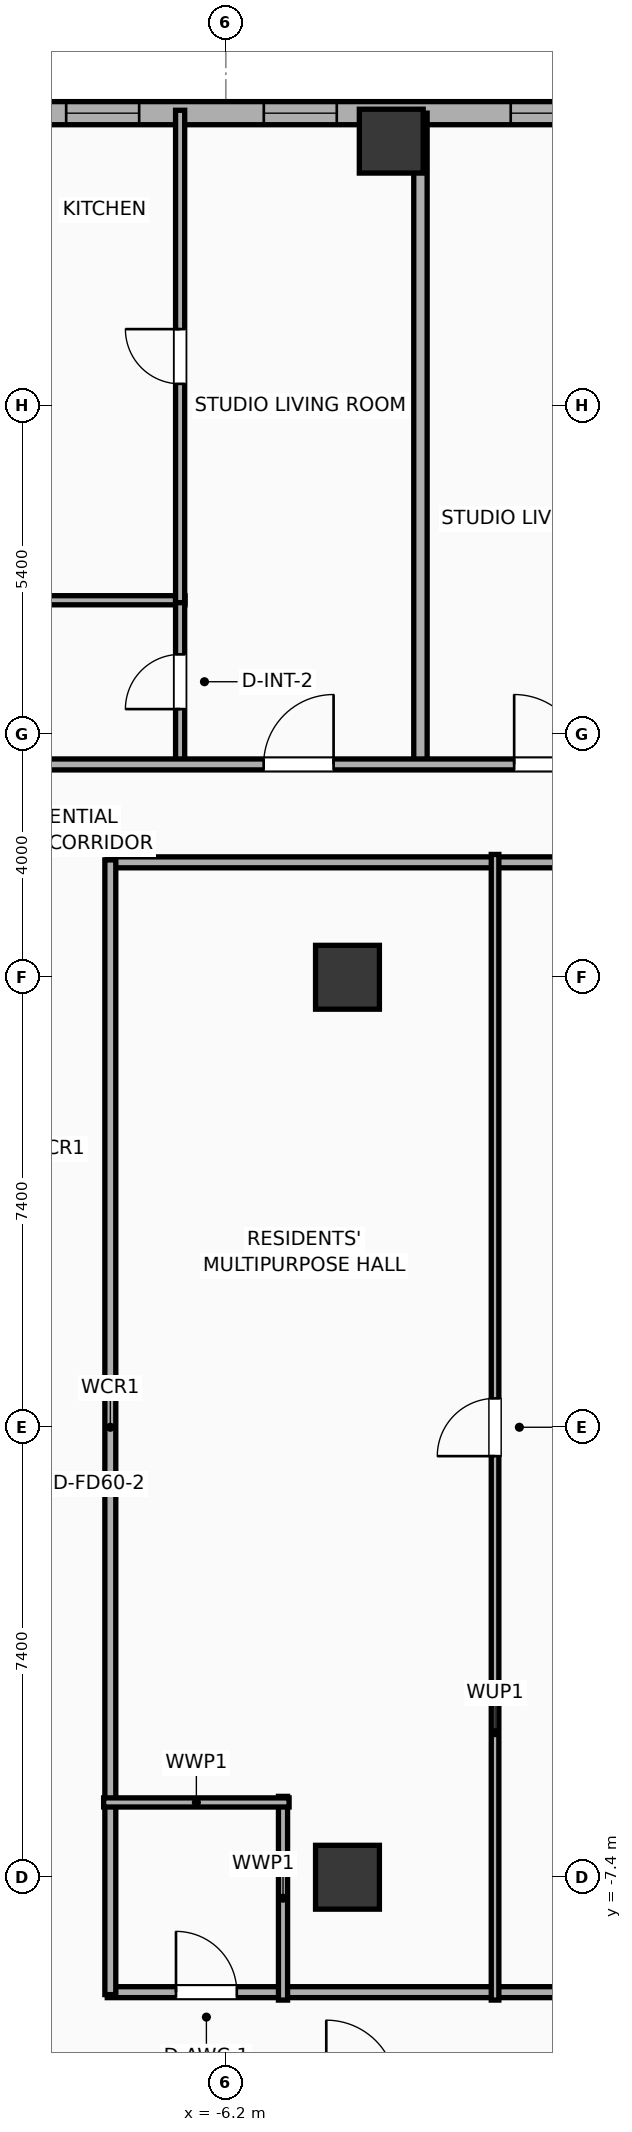
"""IFC4 building model, lengths in metres.
Left out: names, types, materials, properties, quantities, classifications, styles, units other than length and angle.
Written with IfcOpenShell. Run it as: python <this file> out.ifc"""

import sys

from ifc_helpers import new_model, si_unit, direction, frame, frame_2d, origin, origin_2d, place, context, subcontext, project, spatial, rectangle, hollow_rectangle, extrude, element, fill, save


model = new_model("IFC4")
c1 = context("Model", 3, precision=1e-05, world=origin(), true_north=direction((0.0, 1.0)))
c2 = subcontext(c1, "Body", "Model", "MODEL_VIEW")
j1 = project(units=[si_unit("LENGTHUNIT", "METRE"), si_unit("PLANEANGLEUNIT", "RADIAN")], contexts=[c1])
p1 = place(None, origin())
s1 = spatial("IfcSite", under=j1, at=p1, CompositionType="ELEMENT")
p2 = place(p1, origin())
s2 = spatial("IfcBuilding", under=s1, at=p2, CompositionType="ELEMENT")
p3 = place(p2, frame((0.0, 0.0, 89.7)))
s3 = spatial("IfcBuildingStorey", under=s2, at=p3, CompositionType="ELEMENT", Elevation=89.7)
for number, where, z_axis, x_axis in (
    (1, (-4.2, -7.4, 0.0), (0.0, 0.0, 1.0), (1.0, 0.0, 0.0)),
    (2, (-4.2, 7.4, 0.0), (0.0, 0.0, 1.0), (1.0, 0.0, 0.0)),
):
    element("IfcColumn", number, at=place(p3, frame(where, z_axis=z_axis, x_axis=x_axis)), inside=s3, PredefinedType="COLUMN", context=c2, shape_type="SweptSolid", body=[
        extrude(rectangle(XDim=1.05, YDim=1.05, at=origin_2d()), origin(), (0.0, 0.0, 1.0), 3.9),
    ])
p4 = place(p3, frame((-3.48, 21.15, 0.0), z_axis=(0.0, 0.0, 1.0), x_axis=(1.0, 0.0, 0.0)))
e3 = element("IfcColumn", 3, at=p4, inside=s3, PredefinedType="COLUMN", context=c2, shape_type="SweptSolid", body=[
    extrude(hollow_rectangle(XDim=1.05, YDim=1.05, WallThickness=0.036, at=origin_2d()), origin(), (0.0, 0.0, 1.0), 3.9),
])
p5 = place(p3, frame((-25.381, 21.61, 0.0), z_axis=(0.0, 0.0, 1.0), x_axis=(1.0, 0.0, 0.0)))
e4 = element("IfcWall", 4, at=p5, inside=s3, PredefinedType="ELEMENTEDWALL", context=c2, shape_type="SweptSolid", body=[
    extrude(rectangle(XDim=54.763, YDim=0.38, at=frame_2d((27.381, 0.0))), origin(), (0.0, 0.0, 1.0), 2.54),
])
p6 = place(p5, frame((6.495, 0.0, 0.75)))
e5 = element("IfcOpeningElement", 5, at=p6, cuts=e4, PredefinedType="OPENING", context=c2, shape_type="SweptSolid", body=[
    extrude(rectangle(XDim=2.4, YDim=1.63, at=frame_2d((1.2, 0.815))), frame((0.0, 0.2, 0.0), z_axis=(0.0, -1.0, 0.0), x_axis=(1.0, 0.0, 0.0)), (0.0, 0.0, 1.0), 0.4),
])
p7 = place(p5, frame((48.367, 0.0, 0.75)))
e6 = element("IfcOpeningElement", 6, at=p7, cuts=e4, PredefinedType="OPENING", context=c2, shape_type="SweptSolid", body=[
    extrude(rectangle(XDim=2.4, YDim=1.63, at=frame_2d((1.2, 0.815))), frame((0.0, 0.2, 0.0), z_axis=(0.0, -1.0, 0.0), x_axis=(1.0, 0.0, 0.0)), (0.0, 0.0, 1.0), 0.4),
])
p8 = place(p5, frame((1.231, 0.0, 0.75)))
e7 = element("IfcOpeningElement", 7, at=p8, cuts=e4, PredefinedType="OPENING", context=c2, shape_type="SweptSolid", body=[
    extrude(rectangle(XDim=1.2, YDim=1.63, at=frame_2d((0.6, 0.815))), frame((0.0, 0.2, 0.0), z_axis=(0.0, -1.0, 0.0), x_axis=(1.0, 0.0, 0.0)), (0.0, 0.0, 1.0), 0.4),
])
p9 = place(p5, frame((3.772, 0.0, 0.75)))
e8 = element("IfcOpeningElement", 8, at=p9, cuts=e4, PredefinedType="OPENING", context=c2, shape_type="SweptSolid", body=[
    extrude(rectangle(XDim=1.2, YDim=1.63, at=frame_2d((0.6, 0.815))), frame((0.0, 0.2, 0.0), z_axis=(0.0, -1.0, 0.0), x_axis=(1.0, 0.0, 0.0)), (0.0, 0.0, 1.0), 0.4),
])
p10 = place(p5, frame((12.031, 0.0, 0.75)))
e9 = element("IfcOpeningElement", 9, at=p10, cuts=e4, PredefinedType="OPENING", context=c2, shape_type="SweptSolid", body=[
    extrude(rectangle(XDim=1.2, YDim=1.63, at=frame_2d((0.6, 0.815))), frame((0.0, 0.2, 0.0), z_axis=(0.0, -1.0, 0.0), x_axis=(1.0, 0.0, 0.0)), (0.0, 0.0, 1.0), 0.4),
])
p11 = place(p5, frame((19.805, 0.0, 0.75)))
e10 = element("IfcOpeningElement", 10, at=p11, cuts=e4, PredefinedType="OPENING", context=c2, shape_type="SweptSolid", body=[
    extrude(rectangle(XDim=1.2, YDim=1.63, at=frame_2d((0.6, 0.815))), frame((0.0, 0.2, 0.0), z_axis=(0.0, -1.0, 0.0), x_axis=(1.0, 0.0, 0.0)), (0.0, 0.0, 1.0), 0.4),
])
p12 = place(p5, frame((16.555, 0.0, 0.75)))
e11 = element("IfcOpeningElement", 11, at=p12, cuts=e4, PredefinedType="OPENING", context=c2, shape_type="SweptSolid", body=[
    extrude(rectangle(XDim=1.2, YDim=1.63, at=frame_2d((0.6, 0.815))), frame((0.0, 0.2, 0.0), z_axis=(0.0, -1.0, 0.0), x_axis=(1.0, 0.0, 0.0)), (0.0, 0.0, 1.0), 0.4),
])
p13 = place(p5, frame((23.866, 0.0, 0.75)))
e12 = element("IfcOpeningElement", 12, at=p13, cuts=e4, PredefinedType="OPENING", context=c2, shape_type="SweptSolid", body=[
    extrude(rectangle(XDim=1.2, YDim=1.63, at=frame_2d((0.6, 0.815))), frame((0.0, 0.2, 0.0), z_axis=(0.0, -1.0, 0.0), x_axis=(1.0, 0.0, 0.0)), (0.0, 0.0, 1.0), 0.4),
])
p14 = place(p5, frame((27.116, 0.0, 0.75)))
e13 = element("IfcOpeningElement", 13, at=p14, cuts=e4, PredefinedType="OPENING", context=c2, shape_type="SweptSolid", body=[
    extrude(rectangle(XDim=1.2, YDim=1.63, at=frame_2d((0.6, 0.815))), frame((0.0, 0.2, 0.0), z_axis=(0.0, -1.0, 0.0), x_axis=(1.0, 0.0, 0.0)), (0.0, 0.0, 1.0), 0.4),
])
p15 = place(p5, frame((30.931, 0.0, 0.75)))
e14 = element("IfcOpeningElement", 14, at=p15, cuts=e4, PredefinedType="OPENING", context=c2, shape_type="SweptSolid", body=[
    extrude(rectangle(XDim=1.2, YDim=1.63, at=frame_2d((0.6, 0.815))), frame((0.0, 0.2, 0.0), z_axis=(0.0, -1.0, 0.0), x_axis=(1.0, 0.0, 0.0)), (0.0, 0.0, 1.0), 0.4),
])
p16 = place(p5, frame((36.733, 0.0, 0.75)))
e15 = element("IfcOpeningElement", 15, at=p16, cuts=e4, PredefinedType="OPENING", context=c2, shape_type="SweptSolid", body=[
    extrude(rectangle(XDim=1.2, YDim=1.63, at=frame_2d((0.6, 0.815))), frame((0.0, 0.2, 0.0), z_axis=(0.0, -1.0, 0.0), x_axis=(1.0, 0.0, 0.0)), (0.0, 0.0, 1.0), 0.4),
])
p17 = place(p5, frame((39.858, 0.0, 0.75)))
e16 = element("IfcOpeningElement", 16, at=p17, cuts=e4, PredefinedType="OPENING", context=c2, shape_type="SweptSolid", body=[
    extrude(rectangle(XDim=1.2, YDim=1.63, at=frame_2d((0.6, 0.815))), frame((0.0, 0.2, 0.0), z_axis=(0.0, -1.0, 0.0), x_axis=(1.0, 0.0, 0.0)), (0.0, 0.0, 1.0), 0.4),
])
p18 = place(p5, frame((44.636, 0.0, 0.75)))
e17 = element("IfcOpeningElement", 17, at=p18, cuts=e4, PredefinedType="OPENING", context=c2, shape_type="SweptSolid", body=[
    extrude(rectangle(XDim=1.2, YDim=1.63, at=frame_2d((0.6, 0.815))), frame((0.0, 0.2, 0.0), z_axis=(0.0, -1.0, 0.0), x_axis=(1.0, 0.0, 0.0)), (0.0, 0.0, 1.0), 0.4),
])
p19 = place(p5, frame((51.809, 0.0, 0.75)))
e18 = element("IfcOpeningElement", 18, at=p19, cuts=e4, PredefinedType="OPENING", context=c2, shape_type="SweptSolid", body=[
    extrude(rectangle(XDim=1.2, YDim=1.63, at=frame_2d((0.6, 0.815))), frame((0.0, 0.2, 0.0), z_axis=(0.0, -1.0, 0.0), x_axis=(1.0, 0.0, 0.0)), (0.0, 0.0, 1.0), 0.4),
])
p20 = place(p3, frame((-8.15, 9.29, 0.0), z_axis=(0.0, 0.0, 1.0), x_axis=(1.0, 0.0, 0.0)))
e19 = element("IfcWall", 19, at=p20, inside=s3, PredefinedType="PARTITIONING", context=c2, shape_type="SweptSolid", body=[
    extrude(rectangle(XDim=16.3, YDim=0.18, at=frame_2d((8.15, 0.0))), origin(), (0.0, 0.0, 1.0), 3.65),
])
p21 = place(p20, frame((8.49, 0.0, 0.0)))
e20 = element("IfcOpeningElement", 20, at=p21, cuts=e19, PredefinedType="OPENING", context=c2, shape_type="SweptSolid", body=[
    extrude(rectangle(XDim=0.95, YDim=2.05, at=frame_2d((0.475, 1.025))), frame((0.0, 0.1, 0.0), z_axis=(0.0, -1.0, 0.0), x_axis=(1.0, 0.0, 0.0)), (0.0, 0.0, 1.0), 0.2),
])
p22 = place(p3, frame((-8.15, -9.29, 0.0), z_axis=(0.0, 0.0, 1.0), x_axis=(1.0, 0.0, 0.0)))
e21 = element("IfcWall", 21, at=p22, inside=s3, PredefinedType="PARTITIONING", context=c2, shape_type="SweptSolid", body=[
    extrude(rectangle(XDim=16.3, YDim=0.18, at=frame_2d((8.15, 0.0))), origin(), (0.0, 0.0, 1.0), 3.65),
])
p23 = place(p22, frame((1.13, 0.0, 0.0)))
e22 = element("IfcOpeningElement", 22, at=p23, cuts=e21, PredefinedType="OPENING", context=c2, shape_type="SweptSolid", body=[
    extrude(rectangle(XDim=1.0, YDim=2.05, at=frame_2d((0.5, 1.025))), frame((0.0, 0.1, 0.0), z_axis=(0.0, -1.0, 0.0), x_axis=(1.0, 0.0, 0.0)), (0.0, 0.0, 1.0), 0.2),
])
p24 = place(p22, frame((10.12, 0.0, 0.0)))
e23 = element("IfcOpeningElement", 23, at=p24, cuts=e21, PredefinedType="OPENING", context=c2, shape_type="SweptSolid", body=[
    extrude(rectangle(XDim=0.95, YDim=2.05, at=frame_2d((0.475, 1.025))), frame((0.0, 0.1, 0.0), z_axis=(0.0, -1.0, 0.0), x_axis=(1.0, 0.0, 0.0)), (0.0, 0.0, 1.0), 0.2),
])
p25 = place(p3, frame((-8.1, -9.33, 0.0), z_axis=(0.0, 0.0, 1.0), x_axis=(0.0, 1.0, 0.0)))
e24 = element("IfcWall", 24, at=p25, inside=s3, PredefinedType="PARTITIONING", context=c2, shape_type="SweptSolid", body=[
    extrude(rectangle(XDim=18.66, YDim=0.18, at=frame_2d((9.33, 0.0))), origin(), (0.0, 0.0, 1.0), 3.65),
])
p26 = place(p3, frame((-5.26, -9.42, 0.0), z_axis=(0.0, 0.0, 1.0), x_axis=(0.0, 1.0, 0.0)))
e25 = element("IfcWall", 25, at=p26, inside=s3, PredefinedType="PLUMBINGWALL", context=c2, shape_type="SweptSolid", body=[
    extrude(rectangle(XDim=3.35, YDim=0.15, at=frame_2d((1.675, 0.0))), origin(), (0.0, 0.0, 1.0), 3.65),
])
p27 = place(p3, frame((-8.21, -6.17, 0.0), z_axis=(0.0, 0.0, 1.0), x_axis=(1.0, 0.0, 0.0)))
e26 = element("IfcWall", 26, at=p27, inside=s3, PredefinedType="PLUMBINGWALL", context=c2, shape_type="SweptSolid", body=[
    extrude(rectangle(XDim=3.05, YDim=0.15, at=frame_2d((1.525, 0.0))), origin(), (0.0, 0.0, 1.0), 3.65),
])
p28 = place(p3, frame((-1.773, -9.42, 0.0), z_axis=(0.0, 0.0, 1.0), x_axis=(0.0, 1.0, 0.0)))
e27 = element("IfcWall", 27, at=p28, inside=s3, PredefinedType="PARTITIONING", context=c2, shape_type="SweptSolid", body=[
    extrude(rectangle(XDim=18.84, YDim=0.125, at=frame_2d((9.42, 0.0))), origin(), (0.0, 0.0, 1.0), 3.65),
])
p29 = place(p28, frame((8.945, 0.0, 0.0)))
e28 = element("IfcOpeningElement", 28, at=p29, cuts=e27, PredefinedType="OPENING", context=c2, shape_type="SweptSolid", body=[
    extrude(rectangle(XDim=0.95, YDim=2.05, at=frame_2d((0.475, 1.025))), frame((0.0, 0.073, 0.0), z_axis=(0.0, -1.0, 0.0), x_axis=(1.0, 0.0, 0.0)), (0.0, 0.0, 1.0), 0.145),
])
p30 = place(p3, frame((-9.76, 13.6, 0.0), z_axis=(0.0, 0.0, 1.0), x_axis=(1.0, 0.0, 0.0)))
e29 = element("IfcWall", 29, at=p30, inside=s3, PredefinedType="PLUMBINGWALL", context=c2, shape_type="SweptSolid", body=[
    extrude(rectangle(XDim=2.888, YDim=0.15, at=frame_2d((1.444, 0.0))), origin(), (0.0, 0.0, 1.0), 3.65),
])
p31 = place(p3, frame((-6.952, 10.88, 0.0), z_axis=(0.0, 0.0, 1.0), x_axis=(0.0, 1.0, 0.0)))
e30 = element("IfcWall", 30, at=p31, inside=s3, PredefinedType="PLUMBINGWALL", context=c2, shape_type="SweptSolid", body=[
    extrude(rectangle(XDim=2.76, YDim=0.15, at=frame_2d((1.38, 0.0))), origin(), (0.0, 0.0, 1.0), 3.65),
])
p32 = place(p31, frame((0.93, 0.0, 0.0)))
e31 = element("IfcOpeningElement", 31, at=p32, cuts=e30, PredefinedType="OPENING", context=c2, shape_type="SweptSolid", body=[
    extrude(rectangle(XDim=0.9, YDim=2.05, at=frame_2d((0.45, 1.025))), frame((0.0, 0.085, 0.0), z_axis=(0.0, -1.0, 0.0), x_axis=(1.0, 0.0, 0.0)), (0.0, 0.0, 1.0), 0.17),
])
p33 = place(p3, frame((-6.952, 13.56, 0.0), z_axis=(0.0, 0.0, 1.0), x_axis=(0.0, 1.0, 0.0)))
e32 = element("IfcWall", 32, at=p33, inside=s3, PredefinedType="PLUMBINGWALL", context=c2, shape_type="SweptSolid", body=[
    extrude(rectangle(XDim=8.098, YDim=0.15, at=frame_2d((4.049, 0.0))), origin(), (0.0, 0.0, 1.0), 3.65),
])
p34 = place(p33, frame((3.599, 0.0, 0.0)))
e33 = element("IfcOpeningElement", 33, at=p34, cuts=e32, PredefinedType="OPENING", context=c2, shape_type="SweptSolid", body=[
    extrude(rectangle(XDim=0.9, YDim=2.05, at=frame_2d((0.45, 1.025))), frame((0.0, 0.085, 0.0), z_axis=(0.0, -1.0, 0.0), x_axis=(1.0, 0.0, 0.0)), (0.0, 0.0, 1.0), 0.17),
])
p35 = place(p3, frame((-3.0, 10.82, 0.0), z_axis=(0.0, 0.0, 1.0), x_axis=(0.0, 1.0, 0.0)))
e34 = element("IfcWall", 34, at=p35, inside=s3, PredefinedType="PARTITIONING", context=c2, shape_type="SweptSolid", body=[
    extrude(rectangle(XDim=10.79, YDim=0.22, at=frame_2d((5.395, 0.0))), origin(), (0.0, 0.0, 1.0), 2.54),
])
p36 = place(p3, frame((-29.21, 10.9, 0.0), z_axis=(0.0, 0.0, 1.0), x_axis=(1.0, 0.0, 0.0)))
e35 = element("IfcWall", 35, at=p36, inside=s3, PredefinedType="PARTITIONING", context=c2, shape_type="SweptSolid", body=[
    extrude(rectangle(XDim=62.42, YDim=0.18, at=frame_2d((31.21, 0.0))), origin(), (0.0, 0.0, 1.0), 3.65),
])
p37 = place(p36, frame((2.983, 0.0, 0.0)))
e36 = element("IfcOpeningElement", 36, at=p37, cuts=e35, PredefinedType="OPENING", context=c2, shape_type="SweptSolid", body=[
    extrude(rectangle(XDim=0.9, YDim=2.05, at=frame_2d((0.45, 1.025))), frame((0.0, 0.1, 0.0), z_axis=(0.0, -1.0, 0.0), x_axis=(1.0, 0.0, 0.0)), (0.0, 0.0, 1.0), 0.2),
])
p38 = place(p36, frame((9.618, 0.0, 0.0)))
e37 = element("IfcOpeningElement", 37, at=p38, cuts=e35, PredefinedType="OPENING", context=c2, shape_type="SweptSolid", body=[
    extrude(rectangle(XDim=0.9, YDim=2.05, at=frame_2d((0.45, 1.025))), frame((0.0, 0.1, 0.0), z_axis=(0.0, -1.0, 0.0), x_axis=(1.0, 0.0, 0.0)), (0.0, 0.0, 1.0), 0.2),
])
p39 = place(p36, frame((16.135, 0.0, 0.0)))
e38 = element("IfcOpeningElement", 38, at=p39, cuts=e35, PredefinedType="OPENING", context=c2, shape_type="SweptSolid", body=[
    extrude(rectangle(XDim=0.9, YDim=2.05, at=frame_2d((0.45, 1.025))), frame((0.0, 0.1, 0.0), z_axis=(0.0, -1.0, 0.0), x_axis=(1.0, 0.0, 0.0)), (0.0, 0.0, 1.0), 0.2),
])
p40 = place(p36, frame((23.632, 0.0, 0.0)))
e39 = element("IfcOpeningElement", 39, at=p40, cuts=e35, PredefinedType="OPENING", context=c2, shape_type="SweptSolid", body=[
    extrude(rectangle(XDim=1.15, YDim=2.05, at=frame_2d((0.575, 1.025))), frame((0.0, 0.1, 0.0), z_axis=(0.0, -1.0, 0.0), x_axis=(1.0, 0.0, 0.0)), (0.0, 0.0, 1.0), 0.2),
])
p41 = place(p36, frame((27.751, 0.0, 0.0)))
e40 = element("IfcOpeningElement", 40, at=p41, cuts=e35, PredefinedType="OPENING", context=c2, shape_type="SweptSolid", body=[
    extrude(rectangle(XDim=1.15, YDim=2.05, at=frame_2d((0.575, 1.025))), frame((0.0, 0.1, 0.0), z_axis=(0.0, -1.0, 0.0), x_axis=(1.0, 0.0, 0.0)), (0.0, 0.0, 1.0), 0.2),
])
p42 = place(p36, frame((35.635, 0.0, 0.0)))
e41 = element("IfcOpeningElement", 41, at=p42, cuts=e35, PredefinedType="OPENING", context=c2, shape_type="SweptSolid", body=[
    extrude(rectangle(XDim=0.9, YDim=2.05, at=frame_2d((0.45, 1.025))), frame((0.0, 0.1, 0.0), z_axis=(0.0, -1.0, 0.0), x_axis=(1.0, 0.0, 0.0)), (0.0, 0.0, 1.0), 0.2),
])
p43 = place(p36, frame((40.616, 0.0, 0.0)))
e42 = element("IfcOpeningElement", 42, at=p43, cuts=e35, PredefinedType="OPENING", context=c2, shape_type="SweptSolid", body=[
    extrude(rectangle(XDim=1.15, YDim=2.05, at=frame_2d((0.575, 1.025))), frame((0.0, 0.1, 0.0), z_axis=(0.0, -1.0, 0.0), x_axis=(1.0, 0.0, 0.0)), (0.0, 0.0, 1.0), 0.2),
])
p44 = place(p36, frame((48.256, 0.0, 0.0)))
e43 = element("IfcOpeningElement", 43, at=p44, cuts=e35, PredefinedType="OPENING", context=c2, shape_type="SweptSolid", body=[
    extrude(rectangle(XDim=0.9, YDim=2.05, at=frame_2d((0.45, 1.025))), frame((0.0, 0.1, 0.0), z_axis=(0.0, -1.0, 0.0), x_axis=(1.0, 0.0, 0.0)), (0.0, 0.0, 1.0), 0.2),
])
p45 = place(p36, frame((57.032, 0.0, 0.0)))
e44 = element("IfcOpeningElement", 44, at=p45, cuts=e35, PredefinedType="OPENING", context=c2, shape_type="SweptSolid", body=[
    extrude(rectangle(XDim=1.15, YDim=2.05, at=frame_2d((0.575, 1.025))), frame((0.0, 0.1, 0.0), z_axis=(0.0, -1.0, 0.0), x_axis=(1.0, 0.0, 0.0)), (0.0, 0.0, 1.0), 0.2),
])
p46 = place(p11, origin())
e45 = element("IfcWindow", 45, at=p46, inside=s3, PartitioningType="SINGLE_PANEL", PredefinedType="WINDOW", context=c2, shape_type="SweptSolid", body=[
    extrude(rectangle(XDim=1.2, YDim=1.63, at=frame_2d((0.6, 0.815))), frame((0.0, 0.03, 0.0), z_axis=(0.0, -1.0, 0.0), x_axis=(1.0, 0.0, 0.0)), (0.0, 0.0, 1.0), 0.06),
])
fill(e10, e45)
p47 = place(p12, origin())
e46 = element("IfcWindow", 46, at=p47, inside=s3, PartitioningType="SINGLE_PANEL", PredefinedType="WINDOW", context=c2, shape_type="SweptSolid", body=[
    extrude(rectangle(XDim=1.2, YDim=1.63, at=frame_2d((0.6, 0.815))), frame((0.0, 0.03, 0.0), z_axis=(0.0, -1.0, 0.0), x_axis=(1.0, 0.0, 0.0)), (0.0, 0.0, 1.0), 0.06),
])
fill(e11, e46)
p48 = place(p13, origin())
e47 = element("IfcWindow", 47, at=p48, inside=s3, PartitioningType="SINGLE_PANEL", PredefinedType="WINDOW", context=c2, shape_type="SweptSolid", body=[
    extrude(rectangle(XDim=1.2, YDim=1.63, at=frame_2d((0.6, 0.815))), frame((0.0, 0.03, 0.0), z_axis=(0.0, -1.0, 0.0), x_axis=(1.0, 0.0, 0.0)), (0.0, 0.0, 1.0), 0.06),
])
fill(e12, e47)
p49 = place(p23, origin())
e48 = element("IfcDoor", 48, at=p49, inside=s3, OperationType="SINGLE_SWING_LEFT", PredefinedType="DOOR", context=c2, shape_type="SweptSolid", body=[
    extrude(rectangle(XDim=1.0, YDim=2.05, at=frame_2d((0.5, 1.025))), frame((0.0, 0.025, 0.0), z_axis=(0.0, -1.0, 0.0), x_axis=(1.0, 0.0, 0.0)), (0.0, 0.0, 1.0), 0.05),
])
fill(e22, e48)
p50 = place(p29, origin())
e49 = element("IfcDoor", 49, at=p50, inside=s3, OperationType="SINGLE_SWING_LEFT", PredefinedType="DOOR", context=c2, shape_type="SweptSolid", body=[
    extrude(rectangle(XDim=0.95, YDim=2.05, at=frame_2d((0.475, 1.025))), frame((0.0, 0.025, 0.0), z_axis=(0.0, -1.0, 0.0), x_axis=(1.0, 0.0, 0.0)), (0.0, 0.0, 1.0), 0.05),
])
fill(e28, e49)
p51 = place(p32, origin())
e50 = element("IfcDoor", 50, at=p51, inside=s3, OperationType="SINGLE_SWING_LEFT", PredefinedType="DOOR", context=c2, shape_type="SweptSolid", body=[
    extrude(rectangle(XDim=0.9, YDim=2.05, at=frame_2d((0.45, 1.025))), frame((0.0, 0.025, 0.0), z_axis=(0.0, -1.0, 0.0), x_axis=(1.0, 0.0, 0.0)), (0.0, 0.0, 1.0), 0.05),
])
fill(e31, e50)
p52 = place(p34, origin())
e51 = element("IfcDoor", 51, at=p52, inside=s3, OperationType="SINGLE_SWING_RIGHT", PredefinedType="DOOR", context=c2, shape_type="SweptSolid", body=[
    extrude(rectangle(XDim=0.9, YDim=2.05, at=frame_2d((0.45, 1.025))), frame((0.0, 0.025, 0.0), z_axis=(0.0, -1.0, 0.0), x_axis=(1.0, 0.0, 0.0)), (0.0, 0.0, 1.0), 0.05),
])
fill(e33, e51)
p53 = place(p40, origin())
e52 = element("IfcDoor", 52, at=p53, inside=s3, OperationType="SINGLE_SWING_RIGHT", PredefinedType="DOOR", context=c2, shape_type="SweptSolid", body=[
    extrude(rectangle(XDim=1.15, YDim=2.05, at=frame_2d((0.575, 1.025))), frame((0.0, 0.025, 0.0), z_axis=(0.0, -1.0, 0.0), x_axis=(1.0, 0.0, 0.0)), (0.0, 0.0, 1.0), 0.05),
])
fill(e39, e52)
p54 = place(p41, origin())
e53 = element("IfcDoor", 53, at=p54, inside=s3, OperationType="SINGLE_SWING_LEFT", PredefinedType="DOOR", context=c2, shape_type="SweptSolid", body=[
    extrude(rectangle(XDim=1.15, YDim=2.05, at=frame_2d((0.575, 1.025))), frame((0.0, 0.025, 0.0), z_axis=(0.0, -1.0, 0.0), x_axis=(1.0, 0.0, 0.0)), (0.0, 0.0, 1.0), 0.05),
])
fill(e40, e53)
save(model, sys.argv[1])
